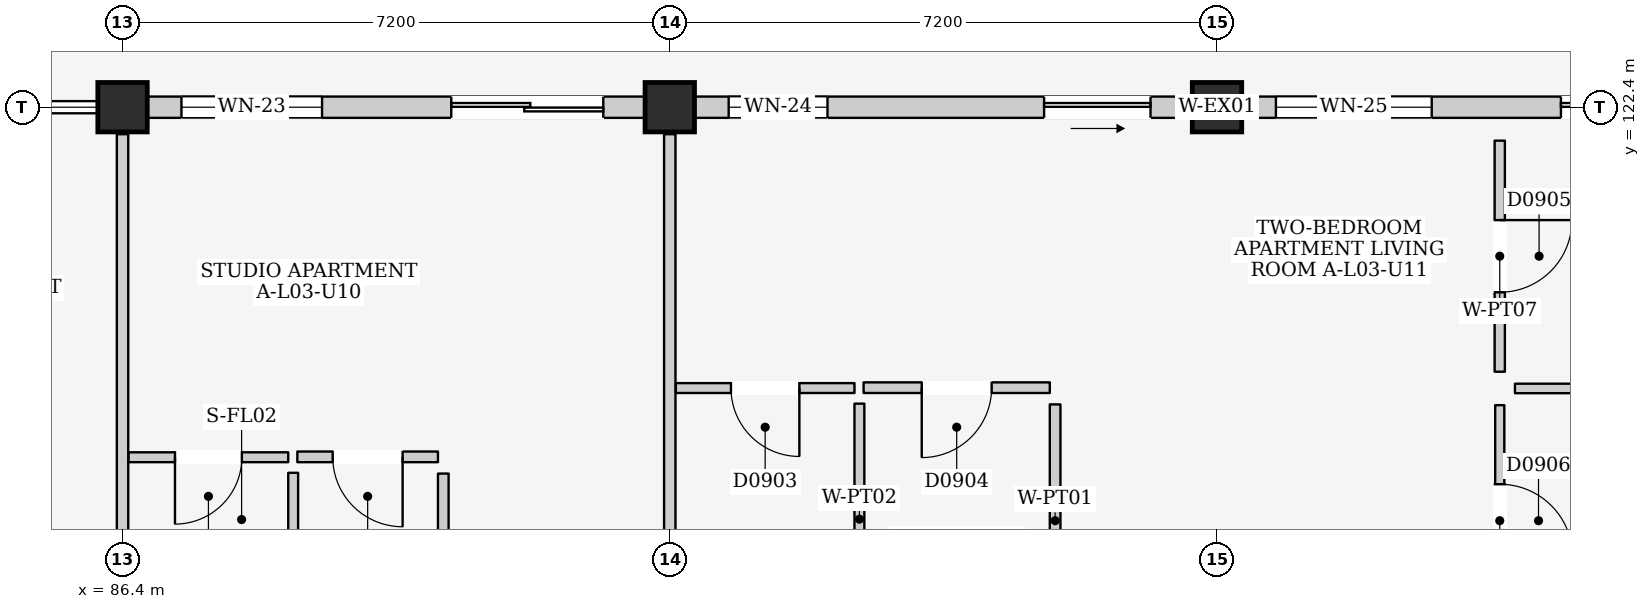
"""IFC4 building model, lengths in metres.
Left out: names, types, materials, properties, quantities, classifications, styles, units other than length and angle.
Written with IfcOpenShell. Run it as: python <this file> out.ifc"""

import sys

from ifc_helpers import new_model, si_unit, direction, frame, frame_2d, origin, origin_2d, place, context, subcontext, project, spatial, rectangle, extrude, element, fill, save


model = new_model("IFC4")
c1 = context("Model", 3, precision=1e-05, world=origin(), true_north=direction((0.0, 1.0)))
c2 = subcontext(c1, "Body", "Model", "MODEL_VIEW")
j1 = project(units=[si_unit("LENGTHUNIT", "METRE"), si_unit("PLANEANGLEUNIT", "RADIAN")], contexts=[c1])
p1 = place(None, origin())
s1 = spatial("IfcSite", under=j1, at=p1, CompositionType="ELEMENT")
p2 = place(p1, origin())
s2 = spatial("IfcBuilding", under=s1, at=p2, CompositionType="ELEMENT")
p3 = place(p2, frame((0.0, 0.0, 12.2)))
s3 = spatial("IfcBuildingStorey", under=s2, at=p3, CompositionType="ELEMENT", Elevation=12.2)
for number, where, z_axis, x_axis in (
    (1, (86.4, 122.4, 0.0), (0.0, 0.0, 1.0), (1.0, 0.0, 0.0)),
    (2, (93.6, 122.4, 0.0), (0.0, 0.0, 1.0), (1.0, 0.0, 0.0)),
    (3, (100.8, 122.4, 0.0), (0.0, 0.0, 1.0), (1.0, 0.0, 0.0)),
):
    element("IfcColumn", number, at=place(p3, frame(where, z_axis=z_axis, x_axis=x_axis)), inside=s3, PredefinedType="COLUMN", context=c2, shape_type="SweptSolid", body=[
        extrude(rectangle(XDim=0.65, YDim=0.65, at=origin_2d()), origin(), (0.0, 0.0, 1.0), 3.2),
    ])
p4 = place(p3, frame((86.725, 122.4, 0.0), z_axis=(0.0, 0.0, 1.0), x_axis=(1.0, 0.0, 0.0)))
e4 = element("IfcWall", 4, at=p4, inside=s3, PredefinedType="ELEMENTEDWALL", context=c2, shape_type="SweptSolid", body=[
    extrude(rectangle(XDim=6.55, YDim=0.28, at=frame_2d((3.275, 0.0))), origin(), (0.0, 0.0, 1.0), 2.445),
])
p5 = place(p4, frame((4.0, 0.0, 0.0)))
e5 = element("IfcOpeningElement", 5, at=p5, cuts=e4, PredefinedType="OPENING", context=c2, shape_type="SweptSolid", body=[
    extrude(rectangle(XDim=2.0, YDim=2.12, at=frame_2d((1.0, 1.06))), frame((0.0, 0.155, 0.0), z_axis=(0.0, -1.0, 0.0), x_axis=(1.0, 0.0, 0.0)), (0.0, 0.0, 1.0), 0.31),
])
p6 = place(p4, frame((0.45, 0.0, 0.9)))
e6 = element("IfcOpeningElement", 6, at=p6, cuts=e4, PredefinedType="OPENING", context=c2, shape_type="SweptSolid", body=[
    extrude(rectangle(XDim=1.85, YDim=1.4, at=frame_2d((0.925, 0.7))), frame((0.0, 0.155, 0.0), z_axis=(0.0, -1.0, 0.0), x_axis=(1.0, 0.0, 0.0)), (0.0, 0.0, 1.0), 0.31),
])
p7 = place(p3, frame((93.925, 122.4, 0.0), z_axis=(0.0, 0.0, 1.0), x_axis=(1.0, 0.0, 0.0)))
e7 = element("IfcWall", 7, at=p7, inside=s3, PredefinedType="ELEMENTEDWALL", context=c2, shape_type="SweptSolid", body=[
    extrude(rectangle(XDim=6.55, YDim=0.28, at=frame_2d((3.275, 0.0))), origin(), (0.0, 0.0, 1.0), 2.445),
])
p8 = place(p7, frame((4.6, 0.0, 0.0)))
e8 = element("IfcOpeningElement", 8, at=p8, cuts=e7, PredefinedType="OPENING", context=c2, shape_type="SweptSolid", body=[
    extrude(rectangle(XDim=1.4, YDim=2.1, at=frame_2d((0.7, 1.05))), frame((0.0, 0.155, 0.0), z_axis=(0.0, -1.0, 0.0), x_axis=(1.0, 0.0, 0.0)), (0.0, 0.0, 1.0), 0.31),
])
p9 = place(p7, frame((0.45, 0.0, 0.9)))
e9 = element("IfcOpeningElement", 9, at=p9, cuts=e7, PredefinedType="OPENING", context=c2, shape_type="SweptSolid", body=[
    extrude(rectangle(XDim=1.3, YDim=1.25, at=frame_2d((0.65, 0.625))), frame((0.0, 0.155, 0.0), z_axis=(0.0, -1.0, 0.0), x_axis=(1.0, 0.0, 0.0)), (0.0, 0.0, 1.0), 0.31),
])
p10 = place(p3, frame((101.125, 122.4, 0.0), z_axis=(0.0, 0.0, 1.0), x_axis=(1.0, 0.0, 0.0)))
e10 = element("IfcWall", 10, at=p10, inside=s3, PredefinedType="ELEMENTEDWALL", context=c2, shape_type="SweptSolid", body=[
    extrude(rectangle(XDim=6.55, YDim=0.28, at=frame_2d((3.275, 0.0))), origin(), (0.0, 0.0, 1.0), 2.445),
])
p11 = place(p10, frame((4.2, 0.0, 0.0)))
e11 = element("IfcOpeningElement", 11, at=p11, cuts=e10, PredefinedType="OPENING", context=c2, shape_type="SweptSolid", body=[
    extrude(rectangle(XDim=1.8, YDim=2.12, at=frame_2d((0.9, 1.06))), frame((0.0, 0.155, 0.0), z_axis=(0.0, -1.0, 0.0), x_axis=(1.0, 0.0, 0.0)), (0.0, 0.0, 1.0), 0.31),
])
p12 = place(p10, frame((0.45, 0.0, 0.735)))
e12 = element("IfcOpeningElement", 12, at=p12, cuts=e10, PredefinedType="OPENING", context=c2, shape_type="SweptSolid", body=[
    extrude(rectangle(XDim=2.05, YDim=1.6, at=frame_2d((1.025, 0.8))), frame((0.0, 0.155, 0.0), z_axis=(0.0, -1.0, 0.0), x_axis=(1.0, 0.0, 0.0)), (0.0, 0.0, 1.0), 0.31),
])
for number, where, z_axis, x_axis in (
    (13, (86.4, 115.555, 0.0), (0.0, 0.0, 1.0), (0.0, 1.0, 0.0)),
    (14, (93.6, 115.555, 0.0), (0.0, 0.0, 1.0), (0.0, 1.0, 0.0)),
):
    element("IfcWall", number, at=place(p3, frame(where, z_axis=z_axis, x_axis=x_axis)), inside=s3, PredefinedType="PARTITIONING", context=c2, shape_type="SweptSolid", body=[
        extrude(rectangle(XDim=6.49, YDim=0.15, at=frame_2d((3.245, 0.0))), origin(), (0.0, 0.0, 1.0), 2.415),
    ])
p13 = place(p3, frame((86.48, 117.795, 0.0), z_axis=(0.0, 0.0, 1.0), x_axis=(1.0, 0.0, 0.0)))
e15 = element("IfcWall", 15, at=p13, inside=s3, PredefinedType="PARTITIONING", context=c2, shape_type="SweptSolid", body=[
    extrude(rectangle(XDim=2.1, YDim=0.13, at=frame_2d((1.05, 0.0))), origin(), (0.0, 0.0, 1.0), 2.98),
])
p14 = place(p13, frame((0.61, 0.0, 0.0)))
e16 = element("IfcOpeningElement", 16, at=p14, cuts=e15, PredefinedType="OPENING", context=c2, shape_type="SweptSolid", body=[
    extrude(rectangle(XDim=0.88, YDim=2.1, at=frame_2d((0.44, 1.05))), frame((0.0, 0.08, 0.0), z_axis=(0.0, -1.0, 0.0), x_axis=(1.0, 0.0, 0.0)), (0.0, 0.0, 1.0), 0.16),
])
p15 = place(p3, frame((88.645, 115.46, 0.0), z_axis=(0.0, 0.0, 1.0), x_axis=(0.0, 1.0, 0.0)))
e17 = element("IfcWall", 17, at=p15, inside=s3, PredefinedType="PARTITIONING", context=c2, shape_type="SweptSolid", body=[
    extrude(rectangle(XDim=2.13, YDim=0.13, at=frame_2d((1.065, 0.0))), origin(), (0.0, 0.0, 1.0), 2.98),
])
p16 = place(p3, frame((88.7, 117.8, 0.0), z_axis=(0.0, 0.0, 1.0), x_axis=(1.0, 0.0, 0.0)))
e18 = element("IfcWall", 18, at=p16, inside=s3, PredefinedType="PARTITIONING", context=c2, shape_type="SweptSolid", body=[
    extrude(rectangle(XDim=1.85, YDim=0.14, at=frame_2d((0.925, 0.0))), origin(), (0.0, 0.0, 1.0), 2.98),
])
p17 = place(p16, frame((0.465, 0.0, 0.0)))
e19 = element("IfcOpeningElement", 19, at=p17, cuts=e18, PredefinedType="OPENING", context=c2, shape_type="SweptSolid", body=[
    extrude(rectangle(XDim=0.92, YDim=2.1, at=frame_2d((0.46, 1.05))), frame((0.0, 0.085, 0.0), z_axis=(0.0, -1.0, 0.0), x_axis=(1.0, 0.0, 0.0)), (0.0, 0.0, 1.0), 0.17),
])
p18 = place(p3, frame((90.62, 115.43, 0.0), z_axis=(0.0, 0.0, 1.0), x_axis=(0.0, 1.0, 0.0)))
e20 = element("IfcWall", 20, at=p18, inside=s3, PredefinedType="PARTITIONING", context=c2, shape_type="SweptSolid", body=[
    extrude(rectangle(XDim=2.15, YDim=0.14, at=frame_2d((1.075, 0.0))), origin(), (0.0, 0.0, 1.0), 2.98),
])
p19 = place(p3, frame((93.68, 118.705, 0.0), z_axis=(0.0, 0.0, 1.0), x_axis=(1.0, 0.0, 0.0)))
e21 = element("IfcWall", 21, at=p19, inside=s3, PredefinedType="PARTITIONING", context=c2, shape_type="SweptSolid", body=[
    extrude(rectangle(XDim=2.35, YDim=0.13, at=frame_2d((1.175, 0.0))), origin(), (0.0, 0.0, 1.0), 2.98),
])
p20 = place(p19, frame((0.725, 0.0, 0.0)))
e22 = element("IfcOpeningElement", 22, at=p20, cuts=e21, PredefinedType="OPENING", context=c2, shape_type="SweptSolid", body=[
    extrude(rectangle(XDim=0.9, YDim=2.1, at=frame_2d((0.45, 1.05))), frame((0.0, 0.08, 0.0), z_axis=(0.0, -1.0, 0.0), x_axis=(1.0, 0.0, 0.0)), (0.0, 0.0, 1.0), 0.16),
])
p21 = place(p3, frame((96.095, 115.46, 0.0), z_axis=(0.0, 0.0, 1.0), x_axis=(0.0, 1.0, 0.0)))
e23 = element("IfcWall", 23, at=p21, inside=s3, PredefinedType="PARTITIONING", context=c2, shape_type="SweptSolid", body=[
    extrude(rectangle(XDim=3.04, YDim=0.13, at=frame_2d((1.52, 0.0))), origin(), (0.0, 0.0, 1.0), 2.98),
])
p22 = place(p3, frame((96.15, 118.71, 0.0), z_axis=(0.0, 0.0, 1.0), x_axis=(1.0, 0.0, 0.0)))
e24 = element("IfcWall", 24, at=p22, inside=s3, PredefinedType="PARTITIONING", context=c2, shape_type="SweptSolid", body=[
    extrude(rectangle(XDim=2.45, YDim=0.14, at=frame_2d((1.225, 0.0))), origin(), (0.0, 0.0, 1.0), 2.98),
])
p23 = place(p22, frame((0.765, 0.0, 0.0)))
e25 = element("IfcOpeningElement", 25, at=p23, cuts=e24, PredefinedType="OPENING", context=c2, shape_type="SweptSolid", body=[
    extrude(rectangle(XDim=0.92, YDim=2.1, at=frame_2d((0.46, 1.05))), frame((0.0, 0.085, 0.0), z_axis=(0.0, -1.0, 0.0), x_axis=(1.0, 0.0, 0.0)), (0.0, 0.0, 1.0), 0.17),
])
p24 = place(p3, frame((98.67, 115.43, 0.0), z_axis=(0.0, 0.0, 1.0), x_axis=(0.0, 1.0, 0.0)))
e26 = element("IfcWall", 26, at=p24, inside=s3, PredefinedType="PARTITIONING", context=c2, shape_type="SweptSolid", body=[
    extrude(rectangle(XDim=3.06, YDim=0.14, at=frame_2d((1.53, 0.0))), origin(), (0.0, 0.0, 1.0), 2.98),
])
p25 = place(p3, frame((104.52, 118.92, 0.0), z_axis=(0.0, 0.0, 1.0), x_axis=(0.0, 1.0, 0.0)))
e27 = element("IfcWall", 27, at=p25, inside=s3, PredefinedType="PARTITIONING", context=c2, shape_type="SweptSolid", body=[
    extrude(rectangle(XDim=3.04, YDim=0.135, at=frame_2d((1.52, 0.0))), origin(), (0.0, 0.0, 1.0), 2.98),
])
p26 = place(p25, frame((1.045, 0.0, 0.0)))
e28 = element("IfcOpeningElement", 28, at=p26, cuts=e27, PredefinedType="OPENING", context=c2, shape_type="SweptSolid", body=[
    extrude(rectangle(XDim=0.95, YDim=2.15, at=frame_2d((0.475, 1.075))), frame((0.0, 0.083, 0.0), z_axis=(0.0, -1.0, 0.0), x_axis=(1.0, 0.0, 0.0)), (0.0, 0.0, 1.0), 0.165),
])
p27 = place(p3, frame((104.72, 118.7, 0.0), z_axis=(0.0, 0.0, 1.0), x_axis=(1.0, 0.0, 0.0)))
e29 = element("IfcWall", 29, at=p27, inside=s3, PredefinedType="PARTITIONING", context=c2, shape_type="SweptSolid", body=[
    extrude(rectangle(XDim=3.06, YDim=0.125, at=frame_2d((1.53, 0.0))), origin(), (0.0, 0.0, 1.0), 2.98),
])
p28 = place(p3, frame((104.52, 115.44, 0.0), z_axis=(0.0, 0.0, 1.0), x_axis=(0.0, 1.0, 0.0)))
e30 = element("IfcWall", 30, at=p28, inside=s3, PredefinedType="PARTITIONING", context=c2, shape_type="SweptSolid", body=[
    extrude(rectangle(XDim=3.04, YDim=0.12, at=frame_2d((1.52, 0.0))), origin(), (0.0, 0.0, 1.0), 2.98),
])
p29 = place(p28, frame((1.04, 0.0, 0.0)))
e31 = element("IfcOpeningElement", 31, at=p29, cuts=e30, PredefinedType="OPENING", context=c2, shape_type="SweptSolid", body=[
    extrude(rectangle(XDim=0.96, YDim=2.15, at=frame_2d((0.48, 1.075))), frame((0.0, 0.075, 0.0), z_axis=(0.0, -1.0, 0.0), x_axis=(1.0, 0.0, 0.0)), (0.0, 0.0, 1.0), 0.15),
])
p30 = place(p5, frame((2.0, 0.0, 0.0), z_axis=(0.0, 0.0, 1.0), x_axis=(-1.0, 0.0, 0.0)))
e32 = element("IfcDoor", 32, at=p30, inside=s3, OperationType="DOUBLE_DOOR_SLIDING", PredefinedType="DOOR", context=c2, shape_type="SweptSolid", body=[
    extrude(rectangle(XDim=2.0, YDim=2.12, at=frame_2d((1.0, 1.06))), frame((0.0, 0.025, 0.0), z_axis=(0.0, -1.0, 0.0), x_axis=(1.0, 0.0, 0.0)), (0.0, 0.0, 1.0), 0.05),
])
fill(e5, e32)
p31 = place(p6, origin())
e33 = element("IfcWindow", 33, at=p31, inside=s3, PartitioningType="DOUBLE_PANEL_VERTICAL", PredefinedType="WINDOW", context=c2, shape_type="SweptSolid", body=[
    extrude(rectangle(XDim=1.85, YDim=1.4, at=frame_2d((0.925, 0.7))), frame((0.0, 0.03, 0.0), z_axis=(0.0, -1.0, 0.0), x_axis=(1.0, 0.0, 0.0)), (0.0, 0.0, 1.0), 0.06),
])
fill(e6, e33)
p32 = place(p8, frame((1.4, 0.0, 0.0), z_axis=(0.0, 0.0, 1.0), x_axis=(-1.0, 0.0, 0.0)))
e34 = element("IfcDoor", 34, at=p32, inside=s3, OperationType="SLIDING_TO_RIGHT", PredefinedType="DOOR", context=c2, shape_type="SweptSolid", body=[
    extrude(rectangle(XDim=1.4, YDim=2.1, at=frame_2d((0.7, 1.05))), frame((0.0, 0.025, 0.0), z_axis=(0.0, -1.0, 0.0), x_axis=(1.0, 0.0, 0.0)), (0.0, 0.0, 1.0), 0.05),
])
fill(e8, e34)
p33 = place(p9, origin())
e35 = element("IfcWindow", 35, at=p33, inside=s3, PartitioningType="SINGLE_PANEL", PredefinedType="WINDOW", context=c2, shape_type="SweptSolid", body=[
    extrude(rectangle(XDim=1.3, YDim=1.25, at=frame_2d((0.65, 0.625))), frame((0.0, 0.03, 0.0), z_axis=(0.0, -1.0, 0.0), x_axis=(1.0, 0.0, 0.0)), (0.0, 0.0, 1.0), 0.06),
])
fill(e9, e35)
p34 = place(p11, frame((1.8, 0.0, 0.0), z_axis=(0.0, 0.0, 1.0), x_axis=(-1.0, 0.0, 0.0)))
e36 = element("IfcDoor", 36, at=p34, inside=s3, OperationType="SLIDING_TO_LEFT", PredefinedType="DOOR", context=c2, shape_type="SweptSolid", body=[
    extrude(rectangle(XDim=1.8, YDim=2.12, at=frame_2d((0.9, 1.06))), frame((0.0, 0.025, 0.0), z_axis=(0.0, -1.0, 0.0), x_axis=(1.0, 0.0, 0.0)), (0.0, 0.0, 1.0), 0.05),
])
fill(e11, e36)
p35 = place(p12, origin())
e37 = element("IfcWindow", 37, at=p35, inside=s3, PartitioningType="DOUBLE_PANEL_VERTICAL", PredefinedType="WINDOW", context=c2, shape_type="SweptSolid", body=[
    extrude(rectangle(XDim=2.05, YDim=1.6, at=frame_2d((1.025, 0.8))), frame((0.0, 0.03, 0.0), z_axis=(0.0, -1.0, 0.0), x_axis=(1.0, 0.0, 0.0)), (0.0, 0.0, 1.0), 0.06),
])
fill(e12, e37)
p36 = place(p14, frame((0.88, 0.0, 0.0), z_axis=(0.0, 0.0, 1.0), x_axis=(-1.0, 0.0, 0.0)))
e38 = element("IfcDoor", 38, at=p36, inside=s3, OperationType="SINGLE_SWING_RIGHT", PredefinedType="DOOR", context=c2, shape_type="SweptSolid", body=[
    extrude(rectangle(XDim=0.88, YDim=2.1, at=frame_2d((0.44, 1.05))), frame((0.0, 0.025, 0.0), z_axis=(0.0, -1.0, 0.0), x_axis=(1.0, 0.0, 0.0)), (0.0, 0.0, 1.0), 0.05),
])
fill(e16, e38)
p37 = place(p17, frame((0.92, 0.0, 0.0), z_axis=(0.0, 0.0, 1.0), x_axis=(-1.0, 0.0, 0.0)))
e39 = element("IfcDoor", 39, at=p37, inside=s3, OperationType="SINGLE_SWING_LEFT", PredefinedType="DOOR", context=c2, shape_type="SweptSolid", body=[
    extrude(rectangle(XDim=0.92, YDim=2.1, at=frame_2d((0.46, 1.05))), frame((0.0, 0.025, 0.0), z_axis=(0.0, -1.0, 0.0), x_axis=(1.0, 0.0, 0.0)), (0.0, 0.0, 1.0), 0.05),
])
fill(e19, e39)
p38 = place(p20, frame((0.9, 0.0, 0.0), z_axis=(0.0, 0.0, 1.0), x_axis=(-1.0, 0.0, 0.0)))
e40 = element("IfcDoor", 40, at=p38, inside=s3, OperationType="SINGLE_SWING_LEFT", PredefinedType="DOOR", context=c2, shape_type="SweptSolid", body=[
    extrude(rectangle(XDim=0.9, YDim=2.1, at=frame_2d((0.45, 1.05))), frame((0.0, 0.025, 0.0), z_axis=(0.0, -1.0, 0.0), x_axis=(1.0, 0.0, 0.0)), (0.0, 0.0, 1.0), 0.05),
])
fill(e22, e40)
p39 = place(p23, frame((0.92, 0.0, 0.0), z_axis=(0.0, 0.0, 1.0), x_axis=(-1.0, 0.0, 0.0)))
e41 = element("IfcDoor", 41, at=p39, inside=s3, OperationType="SINGLE_SWING_RIGHT", PredefinedType="DOOR", context=c2, shape_type="SweptSolid", body=[
    extrude(rectangle(XDim=0.92, YDim=2.1, at=frame_2d((0.46, 1.05))), frame((0.0, 0.025, 0.0), z_axis=(0.0, -1.0, 0.0), x_axis=(1.0, 0.0, 0.0)), (0.0, 0.0, 1.0), 0.05),
])
fill(e25, e41)
p40 = place(p26, frame((0.95, 0.0, 0.0), z_axis=(0.0, 0.0, 1.0), x_axis=(-1.0, 0.0, 0.0)))
e42 = element("IfcDoor", 42, at=p40, inside=s3, OperationType="SINGLE_SWING_LEFT", PredefinedType="DOOR", context=c2, shape_type="SweptSolid", body=[
    extrude(rectangle(XDim=0.95, YDim=2.15, at=frame_2d((0.475, 1.075))), frame((0.0, 0.025, 0.0), z_axis=(0.0, -1.0, 0.0), x_axis=(1.0, 0.0, 0.0)), (0.0, 0.0, 1.0), 0.05),
])
fill(e28, e42)
p41 = place(p29, frame((0.96, 0.0, 0.0), z_axis=(0.0, 0.0, 1.0), x_axis=(-1.0, 0.0, 0.0)))
e43 = element("IfcDoor", 43, at=p41, inside=s3, OperationType="SINGLE_SWING_RIGHT", PredefinedType="DOOR", context=c2, shape_type="SweptSolid", body=[
    extrude(rectangle(XDim=0.96, YDim=2.15, at=frame_2d((0.48, 1.075))), frame((0.0, 0.025, 0.0), z_axis=(0.0, -1.0, 0.0), x_axis=(1.0, 0.0, 0.0)), (0.0, 0.0, 1.0), 0.05),
])
fill(e31, e43)
save(model, sys.argv[1])
